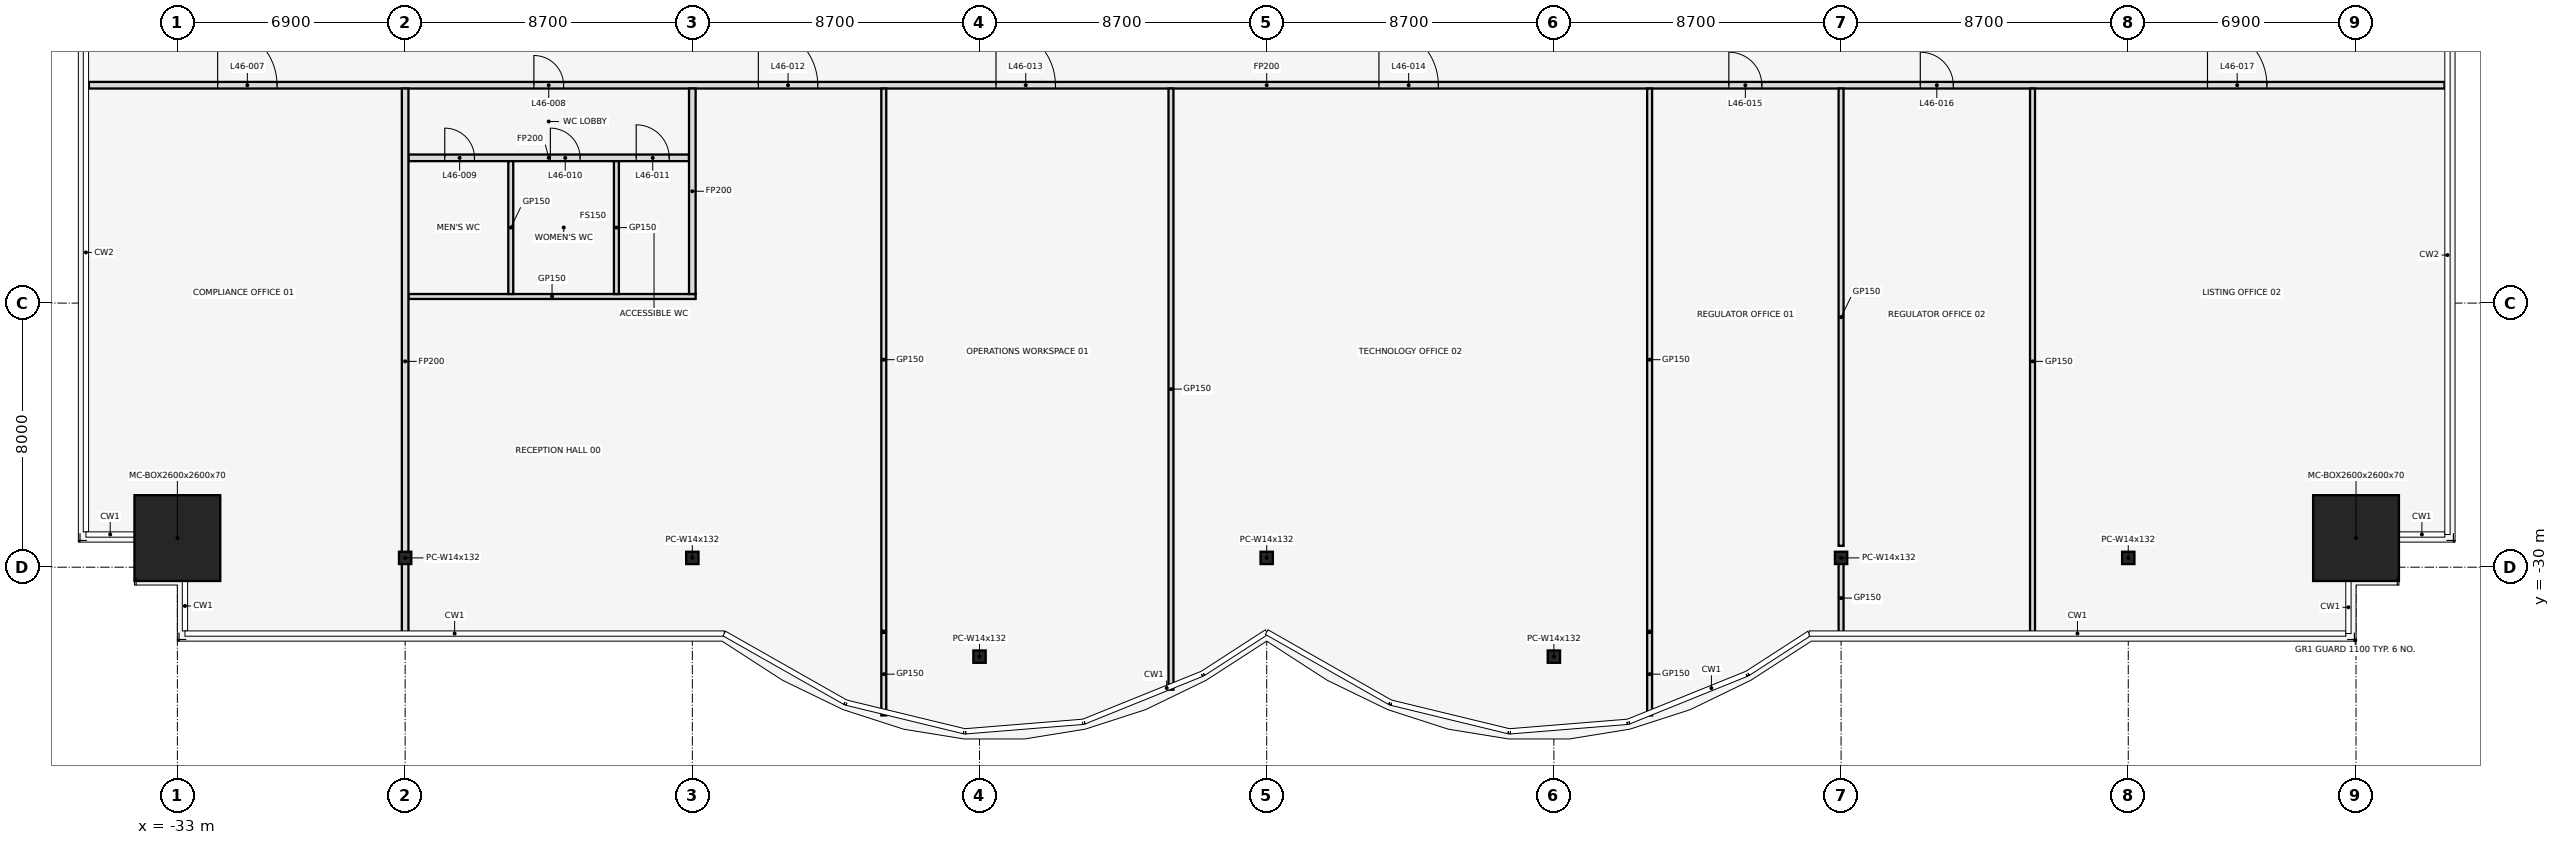
"""IFC4 building model, lengths in metres.
Left out: names, types, materials, properties, quantities, classifications, styles, units other than length and angle.
Written with IfcOpenShell. Run it as: python <this file> out.ifc"""

import sys

from ifc_helpers import new_model, si_unit, direction, frame, frame_2d, origin, origin_2d, place, context, subcontext, project, spatial, rectangle, hollow_rectangle, i_section, extrude, element, fill, save


model = new_model("IFC4")
c1 = context("Model", 3, precision=1e-05, world=origin(), true_north=direction((0.0, 1.0)))
c2 = subcontext(c1, "Body", "Model", "MODEL_VIEW")
j1 = project(units=[si_unit("LENGTHUNIT", "METRE"), si_unit("PLANEANGLEUNIT", "RADIAN")], contexts=[c1])
p1 = place(None, origin())
s1 = spatial("IfcSite", under=j1, at=p1, CompositionType="ELEMENT")
p2 = place(p1, origin())
s2 = spatial("IfcBuilding", under=s1, at=p2, CompositionType="ELEMENT")
p3 = place(p2, frame((0.0, 0.0, 207.3)))
s3 = spatial("IfcBuildingStorey", under=s2, at=p3, CompositionType="ELEMENT", Elevation=207.3)
p4 = place(p3, frame((-33.0, -29.118, 0.0), z_axis=(0.0, 0.0, 1.0), x_axis=(1.0, 0.0, 0.0)))
e1 = element("IfcColumn", 1, at=p4, inside=s3, PredefinedType="COLUMN", context=c2, shape_type="SweptSolid", body=[
    extrude(hollow_rectangle(XDim=2.6, YDim=2.6, WallThickness=0.07, at=origin_2d()), origin(), (0.0, 0.0, 1.0), 4.1),
])
for number, where, z_axis, x_axis in (
    (2, (-26.1, -29.718, 0.0), (0.0, 0.0, 1.0), (1.0, 0.0, 0.0)),
    (3, (-17.4, -29.718, 0.0), (0.0, 0.0, 1.0), (1.0, 0.0, 0.0)),
    (4, (-8.7, -32.709, 0.0), (0.0, 0.0, 1.0), (1.0, 0.0, 0.0)),
    (5, (0.0, -29.718, 0.0), (0.0, 0.0, 1.0), (1.0, 0.0, 0.0)),
    (6, (8.7, -32.709, 0.0), (0.0, 0.0, 1.0), (1.0, 0.0, 0.0)),
    (7, (17.4, -29.718, 0.0), (0.0, 0.0, 1.0), (1.0, 0.0, 0.0)),
    (8, (26.1, -29.718, 0.0), (0.0, 0.0, 1.0), (1.0, 0.0, 0.0)),
):
    element("IfcColumn", number, at=place(p3, frame(where, z_axis=z_axis, x_axis=x_axis)), inside=s3, PredefinedType="COLUMN", context=c2, shape_type="SweptSolid", body=[
        extrude(i_section(OverallWidth=0.373, OverallDepth=0.373, WebThickness=0.016, FlangeThickness=0.026, at=origin_2d()), origin(), (0.0, 0.0, 1.0), 4.1),
    ])
p5 = place(p3, frame((33.0, -29.118, 0.0), z_axis=(0.0, 0.0, 1.0), x_axis=(1.0, 0.0, 0.0)))
e9 = element("IfcColumn", 9, at=p5, inside=s3, PredefinedType="COLUMN", context=c2, shape_type="SweptSolid", body=[
    extrude(hollow_rectangle(XDim=2.6, YDim=2.6, WallThickness=0.07, at=origin_2d()), origin(), (0.0, 0.0, 1.0), 4.1),
])
p6 = place(p3, frame((-26.0, -21.8, 0.0), z_axis=(0.0, 0.0, 1.0), x_axis=(1.0, 0.0, 0.0)))
e10 = element("IfcWall", 10, at=p6, inside=s3, PredefinedType="PARTITIONING", context=c2, shape_type="SweptSolid", body=[
    extrude(rectangle(XDim=8.7, YDim=0.15, at=frame_2d((4.35, 0.0))), origin(), (0.0, 0.0, 1.0), 2.84),
])
p7 = place(p3, frame((-26.0, -17.6, 0.0), z_axis=(0.0, 0.0, 1.0), x_axis=(1.0, 0.0, 0.0)))
e11 = element("IfcWall", 11, at=p7, inside=s3, PredefinedType="PARTITIONING", context=c2, shape_type="SweptSolid", body=[
    extrude(rectangle(XDim=8.5, YDim=0.2, at=frame_2d((4.25, 0.0))), origin(), (0.0, 0.0, 1.0), 2.84),
])
p8 = place(p7, frame((1.1, 0.0, 0.0)))
e12 = element("IfcOpeningElement", 12, at=p8, cuts=e11, PredefinedType="OPENING", context=c2, shape_type="SweptSolid", body=[
    extrude(rectangle(XDim=0.9, YDim=2.1, at=frame_2d((0.45, 1.05))), frame((0.0, 0.112, 0.0), z_axis=(0.0, -1.0, 0.0), x_axis=(1.0, 0.0, 0.0)), (0.0, 0.0, 1.0), 0.224),
])
p9 = place(p7, frame((4.3, 0.0, 0.0)))
e13 = element("IfcOpeningElement", 13, at=p9, cuts=e11, PredefinedType="OPENING", context=c2, shape_type="SweptSolid", body=[
    extrude(rectangle(XDim=0.9, YDim=2.1, at=frame_2d((0.45, 1.05))), frame((0.0, 0.112, 0.0), z_axis=(0.0, -1.0, 0.0), x_axis=(1.0, 0.0, 0.0)), (0.0, 0.0, 1.0), 0.224),
])
p10 = place(p7, frame((6.9, 0.0, 0.0)))
e14 = element("IfcOpeningElement", 14, at=p10, cuts=e11, PredefinedType="OPENING", context=c2, shape_type="SweptSolid", body=[
    extrude(rectangle(XDim=1.0, YDim=2.1, at=frame_2d((0.5, 1.05))), frame((0.0, 0.112, 0.0), z_axis=(0.0, -1.0, 0.0), x_axis=(1.0, 0.0, 0.0)), (0.0, 0.0, 1.0), 0.224),
])
p11 = place(p3, frame((-35.68, -15.4, 0.0), z_axis=(0.0, 0.0, 1.0), x_axis=(1.0, 0.0, 0.0)))
e15 = element("IfcWall", 15, at=p11, inside=s3, PredefinedType="PARTITIONING", context=c2, shape_type="SweptSolid", body=[
    extrude(rectangle(XDim=71.36, YDim=0.2, at=frame_2d((35.68, 0.0))), origin(), (0.0, 0.0, 1.0), 2.84),
])
p12 = place(p11, frame((3.9, 0.0, 0.0)))
e16 = element("IfcOpeningElement", 16, at=p12, cuts=e15, PredefinedType="OPENING", context=c2, shape_type="SweptSolid", body=[
    extrude(rectangle(XDim=1.8, YDim=2.1, at=frame_2d((0.9, 1.05))), frame((0.0, 0.112, 0.0), z_axis=(0.0, -1.0, 0.0), x_axis=(1.0, 0.0, 0.0)), (0.0, 0.0, 1.0), 0.224),
])
p13 = place(p11, frame((13.48, 0.0, 0.0)))
e17 = element("IfcOpeningElement", 17, at=p13, cuts=e15, PredefinedType="OPENING", context=c2, shape_type="SweptSolid", body=[
    extrude(rectangle(XDim=0.9, YDim=2.1, at=frame_2d((0.45, 1.05))), frame((0.0, 0.112, 0.0), z_axis=(0.0, -1.0, 0.0), x_axis=(1.0, 0.0, 0.0)), (0.0, 0.0, 1.0), 0.224),
])
p14 = place(p11, frame((20.28, 0.0, 0.0)))
e18 = element("IfcOpeningElement", 18, at=p14, cuts=e15, PredefinedType="OPENING", context=c2, shape_type="SweptSolid", body=[
    extrude(rectangle(XDim=1.8, YDim=2.1, at=frame_2d((0.9, 1.05))), frame((0.0, 0.112, 0.0), z_axis=(0.0, -1.0, 0.0), x_axis=(1.0, 0.0, 0.0)), (0.0, 0.0, 1.0), 0.224),
])
p15 = place(p11, frame((27.48, 0.0, 0.0)))
e19 = element("IfcOpeningElement", 19, at=p15, cuts=e15, PredefinedType="OPENING", context=c2, shape_type="SweptSolid", body=[
    extrude(rectangle(XDim=1.8, YDim=2.1, at=frame_2d((0.9, 1.05))), frame((0.0, 0.112, 0.0), z_axis=(0.0, -1.0, 0.0), x_axis=(1.0, 0.0, 0.0)), (0.0, 0.0, 1.0), 0.224),
])
p16 = place(p11, frame((39.08, 0.0, 0.0)))
e20 = element("IfcOpeningElement", 20, at=p16, cuts=e15, PredefinedType="OPENING", context=c2, shape_type="SweptSolid", body=[
    extrude(rectangle(XDim=1.8, YDim=2.1, at=frame_2d((0.9, 1.05))), frame((0.0, 0.112, 0.0), z_axis=(0.0, -1.0, 0.0), x_axis=(1.0, 0.0, 0.0)), (0.0, 0.0, 1.0), 0.224),
])
p17 = place(p11, frame((49.68, 0.0, 0.0)))
e21 = element("IfcOpeningElement", 21, at=p17, cuts=e15, PredefinedType="OPENING", context=c2, shape_type="SweptSolid", body=[
    extrude(rectangle(XDim=1.0, YDim=2.1, at=frame_2d((0.5, 1.05))), frame((0.0, 0.112, 0.0), z_axis=(0.0, -1.0, 0.0), x_axis=(1.0, 0.0, 0.0)), (0.0, 0.0, 1.0), 0.224),
])
p18 = place(p11, frame((55.48, 0.0, 0.0)))
e22 = element("IfcOpeningElement", 22, at=p18, cuts=e15, PredefinedType="OPENING", context=c2, shape_type="SweptSolid", body=[
    extrude(rectangle(XDim=1.0, YDim=2.1, at=frame_2d((0.5, 1.05))), frame((0.0, 0.112, 0.0), z_axis=(0.0, -1.0, 0.0), x_axis=(1.0, 0.0, 0.0)), (0.0, 0.0, 1.0), 0.224),
])
p19 = place(p11, frame((64.18, 0.0, 0.0)))
e23 = element("IfcOpeningElement", 23, at=p19, cuts=e15, PredefinedType="OPENING", context=c2, shape_type="SweptSolid", body=[
    extrude(rectangle(XDim=1.8, YDim=2.1, at=frame_2d((0.9, 1.05))), frame((0.0, 0.112, 0.0), z_axis=(0.0, -1.0, 0.0), x_axis=(1.0, 0.0, 0.0)), (0.0, 0.0, 1.0), 0.224),
])
p20 = place(p3, frame((-26.1, -32.03, 0.0), z_axis=(0.0, 0.0, 1.0), x_axis=(0.0, 1.0, 0.0)))
e24 = element("IfcWall", 24, at=p20, inside=s3, PredefinedType="PARTITIONING", context=c2, shape_type="SweptSolid", body=[
    extrude(rectangle(XDim=16.53, YDim=0.2, at=frame_2d((8.265, 0.0))), origin(), (0.0, 0.0, 1.0), 2.84),
])
for number, where, z_axis, x_axis in (
    (25, (-22.9, -21.725, 0.0), (0.0, 0.0, 1.0), (0.0, 1.0, 0.0)),
    (26, (-19.7, -21.725, 0.0), (0.0, 0.0, 1.0), (0.0, 1.0, 0.0)),
):
    element("IfcWall", number, at=place(p3, frame(where, z_axis=z_axis, x_axis=x_axis)), inside=s3, PredefinedType="PARTITIONING", context=c2, shape_type="SweptSolid", body=[
        extrude(rectangle(XDim=4.025, YDim=0.15, at=frame_2d((2.013, 0.0))), origin(), (0.0, 0.0, 1.0), 2.84),
    ])
p21 = place(p3, frame((-17.4, -21.725, 0.0), z_axis=(0.0, 0.0, 1.0), x_axis=(0.0, 1.0, 0.0)))
e27 = element("IfcWall", 27, at=p21, inside=s3, PredefinedType="PARTITIONING", context=c2, shape_type="SweptSolid", body=[
    extrude(rectangle(XDim=6.225, YDim=0.2, at=frame_2d((3.113, 0.0))), origin(), (0.0, 0.0, 1.0), 2.84),
])
p22 = place(p3, frame((-11.6, -34.49, 0.0), z_axis=(0.0, 0.0, 1.0), x_axis=(0.0, 1.0, 0.0)))
e28 = element("IfcWall", 28, at=p22, inside=s3, PredefinedType="PARTITIONING", context=c2, shape_type="SweptSolid", body=[
    extrude(rectangle(XDim=2.5, YDim=0.15, at=frame_2d((1.25, 0.0))), origin(), (0.0, 0.0, 1.0), 2.84),
])
p23 = place(p3, frame((-11.6, -31.927, 0.0), z_axis=(0.0, 0.0, 1.0), x_axis=(0.0, 1.0, 0.0)))
e29 = element("IfcWall", 29, at=p23, inside=s3, PredefinedType="PARTITIONING", context=c2, shape_type="SweptSolid", body=[
    extrude(rectangle(XDim=16.427, YDim=0.15, at=frame_2d((8.213, 0.0))), origin(), (0.0, 0.0, 1.0), 2.84),
])
p24 = place(p3, frame((-2.9, -33.71, 0.0), z_axis=(0.0, 0.0, 1.0), x_axis=(0.0, 1.0, 0.0)))
e30 = element("IfcWall", 30, at=p24, inside=s3, PredefinedType="PARTITIONING", context=c2, shape_type="SweptSolid", body=[
    extrude(rectangle(XDim=18.21, YDim=0.15, at=frame_2d((9.105, 0.0))), origin(), (0.0, 0.0, 1.0), 2.84),
])
p25 = place(p3, frame((11.6, -34.49, 0.0), z_axis=(0.0, 0.0, 1.0), x_axis=(0.0, 1.0, 0.0)))
e31 = element("IfcWall", 31, at=p25, inside=s3, PredefinedType="PARTITIONING", context=c2, shape_type="SweptSolid", body=[
    extrude(rectangle(XDim=2.5, YDim=0.15, at=frame_2d((1.25, 0.0))), origin(), (0.0, 0.0, 1.0), 2.84),
])
p26 = place(p3, frame((11.6, -31.927, 0.0), z_axis=(0.0, 0.0, 1.0), x_axis=(0.0, 1.0, 0.0)))
e32 = element("IfcWall", 32, at=p26, inside=s3, PredefinedType="PARTITIONING", context=c2, shape_type="SweptSolid", body=[
    extrude(rectangle(XDim=16.427, YDim=0.15, at=frame_2d((8.213, 0.0))), origin(), (0.0, 0.0, 1.0), 2.84),
])
p27 = place(p3, frame((17.4, -32.03, 0.0), z_axis=(0.0, 0.0, 1.0), x_axis=(0.0, 1.0, 0.0)))
e33 = element("IfcWall", 33, at=p27, inside=s3, PredefinedType="PARTITIONING", context=c2, shape_type="SweptSolid", body=[
    extrude(rectangle(XDim=2.19, YDim=0.15, at=frame_2d((1.095, 0.0))), origin(), (0.0, 0.0, 1.0), 2.84),
])
p28 = place(p3, frame((17.4, -29.352, 0.0), z_axis=(0.0, 0.0, 1.0), x_axis=(0.0, 1.0, 0.0)))
e34 = element("IfcWall", 34, at=p28, inside=s3, PredefinedType="PARTITIONING", context=c2, shape_type="SweptSolid", body=[
    extrude(rectangle(XDim=13.852, YDim=0.15, at=frame_2d((6.926, 0.0))), origin(), (0.0, 0.0, 1.0), 2.84),
])
p29 = place(p3, frame((23.2, -32.03, 0.0), z_axis=(0.0, 0.0, 1.0), x_axis=(0.0, 1.0, 0.0)))
e35 = element("IfcWall", 35, at=p29, inside=s3, PredefinedType="PARTITIONING", context=c2, shape_type="SweptSolid", body=[
    extrude(rectangle(XDim=16.53, YDim=0.15, at=frame_2d((8.265, 0.0))), origin(), (0.0, 0.0, 1.0), 2.84),
])
p30 = place(p12, origin())
e36 = element("IfcDoor", 36, at=p30, inside=s3, OperationType="SINGLE_SWING_LEFT", PredefinedType="DOOR", context=c2, shape_type="SweptSolid", body=[
    extrude(rectangle(XDim=1.8, YDim=2.1, at=frame_2d((0.9, 1.05))), frame((0.0, 0.025, 0.0), z_axis=(0.0, -1.0, 0.0), x_axis=(1.0, 0.0, 0.0)), (0.0, 0.0, 1.0), 0.05),
])
fill(e16, e36)
p31 = place(p13, frame((0.9, 0.0, 0.0), z_axis=(0.0, 0.0, 1.0), x_axis=(-1.0, 0.0, 0.0)))
e37 = element("IfcDoor", 37, at=p31, inside=s3, OperationType="SINGLE_SWING_RIGHT", PredefinedType="DOOR", context=c2, shape_type="SweptSolid", body=[
    extrude(rectangle(XDim=0.9, YDim=2.1, at=frame_2d((0.45, 1.05))), frame((0.0, 0.025, 0.0), z_axis=(0.0, -1.0, 0.0), x_axis=(1.0, 0.0, 0.0)), (0.0, 0.0, 1.0), 0.05),
])
fill(e17, e37)
p32 = place(p8, frame((0.9, 0.0, 0.0), z_axis=(0.0, 0.0, 1.0), x_axis=(-1.0, 0.0, 0.0)))
e38 = element("IfcDoor", 38, at=p32, inside=s3, OperationType="SINGLE_SWING_RIGHT", PredefinedType="DOOR", context=c2, shape_type="SweptSolid", body=[
    extrude(rectangle(XDim=0.9, YDim=2.1, at=frame_2d((0.45, 1.05))), frame((0.0, 0.025, 0.0), z_axis=(0.0, -1.0, 0.0), x_axis=(1.0, 0.0, 0.0)), (0.0, 0.0, 1.0), 0.05),
])
fill(e12, e38)
p33 = place(p9, frame((0.9, 0.0, 0.0), z_axis=(0.0, 0.0, 1.0), x_axis=(-1.0, 0.0, 0.0)))
e39 = element("IfcDoor", 39, at=p33, inside=s3, OperationType="SINGLE_SWING_LEFT", PredefinedType="DOOR", context=c2, shape_type="SweptSolid", body=[
    extrude(rectangle(XDim=0.9, YDim=2.1, at=frame_2d((0.45, 1.05))), frame((0.0, 0.025, 0.0), z_axis=(0.0, -1.0, 0.0), x_axis=(1.0, 0.0, 0.0)), (0.0, 0.0, 1.0), 0.05),
])
fill(e13, e39)
p34 = place(p10, frame((1.0, 0.0, 0.0), z_axis=(0.0, 0.0, 1.0), x_axis=(-1.0, 0.0, 0.0)))
e40 = element("IfcDoor", 40, at=p34, inside=s3, OperationType="SINGLE_SWING_RIGHT", PredefinedType="DOOR", context=c2, shape_type="SweptSolid", body=[
    extrude(rectangle(XDim=1.0, YDim=2.1, at=frame_2d((0.5, 1.05))), frame((0.0, 0.025, 0.0), z_axis=(0.0, -1.0, 0.0), x_axis=(1.0, 0.0, 0.0)), (0.0, 0.0, 1.0), 0.05),
])
fill(e14, e40)
p35 = place(p14, origin())
e41 = element("IfcDoor", 41, at=p35, inside=s3, OperationType="SINGLE_SWING_LEFT", PredefinedType="DOOR", context=c2, shape_type="SweptSolid", body=[
    extrude(rectangle(XDim=1.8, YDim=2.1, at=frame_2d((0.9, 1.05))), frame((0.0, 0.025, 0.0), z_axis=(0.0, -1.0, 0.0), x_axis=(1.0, 0.0, 0.0)), (0.0, 0.0, 1.0), 0.05),
])
fill(e18, e41)
p36 = place(p15, origin())
e42 = element("IfcDoor", 42, at=p36, inside=s3, OperationType="SINGLE_SWING_LEFT", PredefinedType="DOOR", context=c2, shape_type="SweptSolid", body=[
    extrude(rectangle(XDim=1.8, YDim=2.1, at=frame_2d((0.9, 1.05))), frame((0.0, 0.025, 0.0), z_axis=(0.0, -1.0, 0.0), x_axis=(1.0, 0.0, 0.0)), (0.0, 0.0, 1.0), 0.05),
])
fill(e19, e42)
p37 = place(p16, origin())
e43 = element("IfcDoor", 43, at=p37, inside=s3, OperationType="SINGLE_SWING_LEFT", PredefinedType="DOOR", context=c2, shape_type="SweptSolid", body=[
    extrude(rectangle(XDim=1.8, YDim=2.1, at=frame_2d((0.9, 1.05))), frame((0.0, 0.025, 0.0), z_axis=(0.0, -1.0, 0.0), x_axis=(1.0, 0.0, 0.0)), (0.0, 0.0, 1.0), 0.05),
])
fill(e20, e43)
p38 = place(p17, frame((1.0, 0.0, 0.0), z_axis=(0.0, 0.0, 1.0), x_axis=(-1.0, 0.0, 0.0)))
e44 = element("IfcDoor", 44, at=p38, inside=s3, OperationType="SINGLE_SWING_RIGHT", PredefinedType="DOOR", context=c2, shape_type="SweptSolid", body=[
    extrude(rectangle(XDim=1.0, YDim=2.1, at=frame_2d((0.5, 1.05))), frame((0.0, 0.025, 0.0), z_axis=(0.0, -1.0, 0.0), x_axis=(1.0, 0.0, 0.0)), (0.0, 0.0, 1.0), 0.05),
])
fill(e21, e44)
p39 = place(p18, frame((1.0, 0.0, 0.0), z_axis=(0.0, 0.0, 1.0), x_axis=(-1.0, 0.0, 0.0)))
e45 = element("IfcDoor", 45, at=p39, inside=s3, OperationType="SINGLE_SWING_LEFT", PredefinedType="DOOR", context=c2, shape_type="SweptSolid", body=[
    extrude(rectangle(XDim=1.0, YDim=2.1, at=frame_2d((0.5, 1.05))), frame((0.0, 0.025, 0.0), z_axis=(0.0, -1.0, 0.0), x_axis=(1.0, 0.0, 0.0)), (0.0, 0.0, 1.0), 0.05),
])
fill(e22, e45)
p40 = place(p19, origin())
e46 = element("IfcDoor", 46, at=p40, inside=s3, OperationType="SINGLE_SWING_LEFT", PredefinedType="DOOR", context=c2, shape_type="SweptSolid", body=[
    extrude(rectangle(XDim=1.8, YDim=2.1, at=frame_2d((0.9, 1.05))), frame((0.0, 0.025, 0.0), z_axis=(0.0, -1.0, 0.0), x_axis=(1.0, 0.0, 0.0)), (0.0, 0.0, 1.0), 0.05),
])
fill(e23, e46)
save(model, sys.argv[1])
